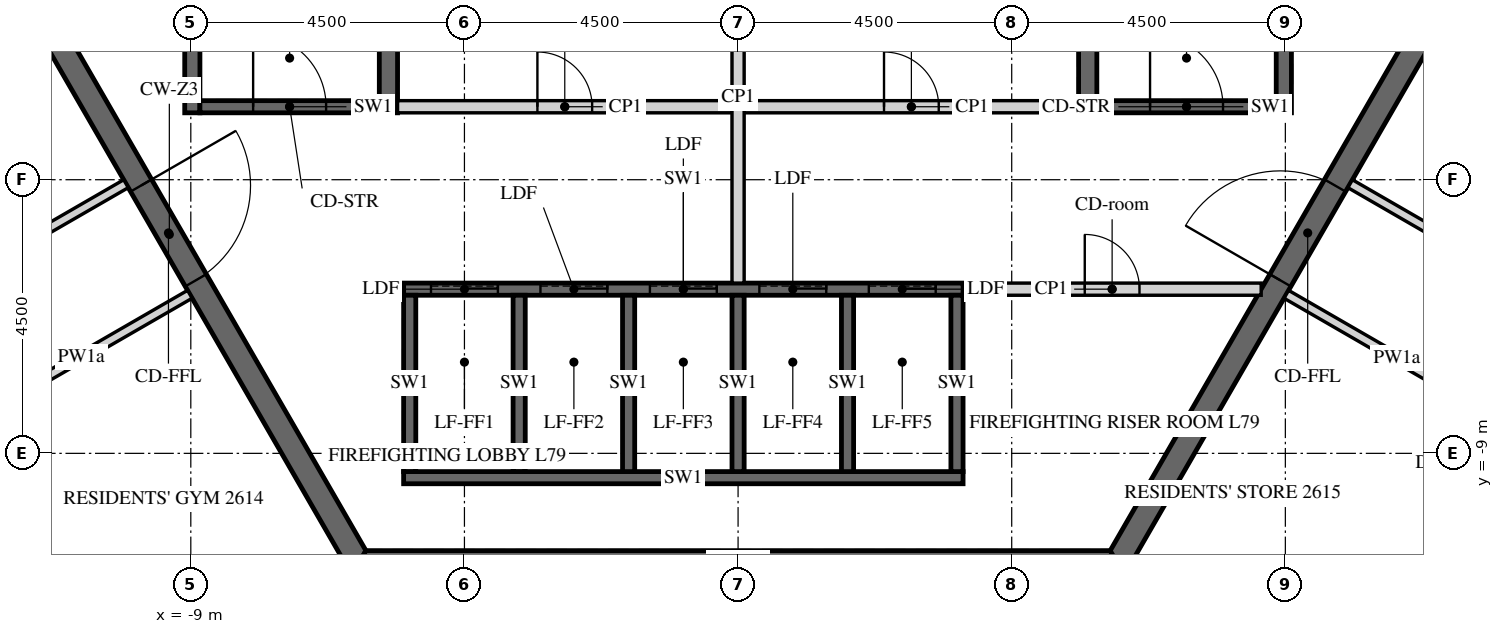
"""IFC4 building model, lengths in metres.
Left out: names, types, materials, properties, quantities, classifications, styles, units other than length and angle.
Written with IfcOpenShell. Run it as: python <this file> out.ifc"""

import sys

from ifc_helpers import new_model, si_unit, direction, frame, frame_2d, origin, place, context, subcontext, project, spatial, polyline, rectangle, outline, extrude, element, fill, save


model = new_model("IFC4")
c1 = context("Model", 3, precision=1e-05, world=origin(), true_north=direction((0.0, 1.0)))
c2 = subcontext(c1, "Body", "Model", "MODEL_VIEW")
j1 = project(units=[si_unit("LENGTHUNIT", "METRE"), si_unit("PLANEANGLEUNIT", "RADIAN")], contexts=[c1])
p1 = place(None, origin())
s1 = spatial("IfcSite", under=j1, at=p1, CompositionType="ELEMENT")
p2 = place(p1, origin())
s2 = spatial("IfcBuilding", under=s1, at=p2, CompositionType="ELEMENT")
p3 = place(p2, frame((0.0, 0.0, 326.4)))
s3 = spatial("IfcBuildingStorey", under=s2, at=p3, CompositionType="ELEMENT", Elevation=326.4)
p4 = place(p3, frame((-12.471, 0.0, -0.15), z_axis=(0.0, 0.0, 1.0), x_axis=(0.499996419489, -0.866027470984, 0.0)))
e1 = element("IfcWall", 1, at=p4, inside=s3, PredefinedType="SHEAR", context=c2, shape_type="SweptSolid", body=[
    extrude(outline(polyline([(-0.115, -0.2), (12.586, -0.2), (12.355, 0.2), (0.115, 0.2), (-0.115, -0.2)])), origin(), (0.0, 0.0, 1.0), 3.9),
])
p5 = place(p4, frame((5.306, 0.0, 0.15)))
e2 = element("IfcOpeningElement", 2, at=p5, cuts=e1, PredefinedType="OPENING", context=c2, shape_type="SweptSolid", body=[
    extrude(rectangle(XDim=1.8, YDim=2.4, at=frame_2d((0.9, 1.2))), frame((0.0, 0.21, 0.0), z_axis=(0.0, -1.0, 0.0), x_axis=(1.0, 0.0, 0.0)), (0.0, 0.0, 1.0), 0.42),
])
p6 = place(p3, frame((-6.235, -10.8, -0.15), z_axis=(0.0, 0.0, 1.0), x_axis=(1.0, 0.0, 0.0)))
e3 = element("IfcWall", 3, at=p6, inside=s3, PredefinedType="SHEAR", context=c2, shape_type="SweptSolid", body=[
    extrude(outline(polyline([(-0.115, -0.2), (12.586, -0.2), (12.355, 0.2), (0.115, 0.2), (-0.115, -0.2)])), origin(), (0.0, 0.0, 1.0), 3.9),
])
p7 = place(p3, frame((6.235, -10.8, -0.15), z_axis=(0.0, 0.0, 1.0), x_axis=(0.499996419489, 0.866027470984, 0.0)))
e4 = element("IfcWall", 4, at=p7, inside=s3, PredefinedType="SHEAR", context=c2, shape_type="SweptSolid", body=[
    extrude(outline(polyline([(-0.115, -0.2), (12.586, -0.2), (12.355, 0.2), (0.115, 0.2), (-0.115, -0.2)])), origin(), (0.0, 0.0, 1.0), 3.9),
])
p8 = place(p7, frame((5.364, 0.0, 0.15)))
e5 = element("IfcOpeningElement", 5, at=p8, cuts=e4, PredefinedType="OPENING", context=c2, shape_type="SweptSolid", body=[
    extrude(rectangle(XDim=1.8, YDim=2.4, at=frame_2d((0.9, 1.2))), frame((0.0, 0.21, 0.0), z_axis=(0.0, -1.0, 0.0), x_axis=(1.0, 0.0, 0.0)), (0.0, 0.0, 1.0), 0.42),
])
p9 = place(p3, frame((-5.5, -6.3, -0.25), z_axis=(0.0, 0.0, 1.0), x_axis=(1.0, 0.0, 0.0)))
e6 = element("IfcWall", 6, at=p9, inside=s3, PredefinedType="SHEAR", context=c2, shape_type="SweptSolid", body=[
    extrude(rectangle(XDim=9.2, YDim=0.2, at=frame_2d((4.6, 0.0))), origin(), (0.0, 0.0, 1.0), 3.9),
])
p10 = place(p9, frame((0.45, 0.0, 0.25)))
e7 = element("IfcOpeningElement", 7, at=p10, cuts=e6, PredefinedType="OPENING", context=c2, shape_type="SweptSolid", body=[
    extrude(rectangle(XDim=1.1, YDim=2.1, at=frame_2d((0.55, 1.05))), frame((0.0, 0.11, 0.0), z_axis=(0.0, -1.0, 0.0), x_axis=(1.0, 0.0, 0.0)), (0.0, 0.0, 1.0), 0.22),
])
p11 = place(p9, frame((2.25, 0.0, 0.25)))
e8 = element("IfcOpeningElement", 8, at=p11, cuts=e6, PredefinedType="OPENING", context=c2, shape_type="SweptSolid", body=[
    extrude(rectangle(XDim=1.1, YDim=2.1, at=frame_2d((0.55, 1.05))), frame((0.0, 0.11, 0.0), z_axis=(0.0, -1.0, 0.0), x_axis=(1.0, 0.0, 0.0)), (0.0, 0.0, 1.0), 0.22),
])
p12 = place(p9, frame((4.05, 0.0, 0.25)))
e9 = element("IfcOpeningElement", 9, at=p12, cuts=e6, PredefinedType="OPENING", context=c2, shape_type="SweptSolid", body=[
    extrude(rectangle(XDim=1.1, YDim=2.1, at=frame_2d((0.55, 1.05))), frame((0.0, 0.11, 0.0), z_axis=(0.0, -1.0, 0.0), x_axis=(1.0, 0.0, 0.0)), (0.0, 0.0, 1.0), 0.22),
])
p13 = place(p9, frame((5.85, 0.0, 0.25)))
e10 = element("IfcOpeningElement", 10, at=p13, cuts=e6, PredefinedType="OPENING", context=c2, shape_type="SweptSolid", body=[
    extrude(rectangle(XDim=1.1, YDim=2.1, at=frame_2d((0.55, 1.05))), frame((0.0, 0.11, 0.0), z_axis=(0.0, -1.0, 0.0), x_axis=(1.0, 0.0, 0.0)), (0.0, 0.0, 1.0), 0.22),
])
p14 = place(p9, frame((7.65, 0.0, 0.25)))
e11 = element("IfcOpeningElement", 11, at=p14, cuts=e6, PredefinedType="OPENING", context=c2, shape_type="SweptSolid", body=[
    extrude(rectangle(XDim=1.1, YDim=2.1, at=frame_2d((0.55, 1.05))), frame((0.0, 0.11, 0.0), z_axis=(0.0, -1.0, 0.0), x_axis=(1.0, 0.0, 0.0)), (0.0, 0.0, 1.0), 0.22),
])
p15 = place(p3, frame((-5.5, -9.4, -0.25), z_axis=(0.0, 0.0, 1.0), x_axis=(1.0, 0.0, 0.0)))
e12 = element("IfcWall", 12, at=p15, inside=s3, PredefinedType="SHEAR", context=c2, shape_type="SweptSolid", body=[
    extrude(rectangle(XDim=9.2, YDim=0.2, at=frame_2d((4.6, 0.0))), origin(), (0.0, 0.0, 1.0), 3.9),
])
for number, where, z_axis, x_axis in (
    (13, (-5.4, -9.3, -0.25), (0.0, 0.0, 1.0), (0.0, 1.0, 0.0)),
    (14, (-3.6, -9.3, -0.25), (0.0, 0.0, 1.0), (0.0, 1.0, 0.0)),
    (15, (-1.8, -9.3, -0.25), (0.0, 0.0, 1.0), (0.0, 1.0, 0.0)),
    (16, (0.0, -9.3, -0.25), (0.0, 0.0, 1.0), (0.0, 1.0, 0.0)),
    (17, (1.8, -9.3, -0.25), (0.0, 0.0, 1.0), (0.0, 1.0, 0.0)),
    (18, (3.6, -9.3, -0.25), (0.0, 0.0, 1.0), (0.0, 1.0, 0.0)),
):
    element("IfcWall", number, at=place(p3, frame(where, z_axis=z_axis, x_axis=x_axis)), inside=s3, PredefinedType="SHEAR", context=c2, shape_type="SweptSolid", body=[
        extrude(rectangle(XDim=2.9, YDim=0.2, at=frame_2d((1.45, 0.0))), origin(), (0.0, 0.0, 1.0), 3.9),
    ])
p16 = place(p3, frame((-5.6, -3.3, 0.0), z_axis=(0.0, 0.0, 1.0), x_axis=(1.0, 0.0, 0.0)))
e19 = element("IfcWall", 19, at=p16, inside=s3, PredefinedType="PARTITIONING", context=c2, shape_type="SweptSolid", body=[
    extrude(rectangle(XDim=5.5, YDim=0.2, at=frame_2d((2.75, 0.0))), origin(), (0.0, 0.0, 1.0), 3.65),
])
p17 = place(p16, frame((2.3, 0.0, 0.0)))
e20 = element("IfcOpeningElement", 20, at=p17, cuts=e19, PredefinedType="OPENING", context=c2, shape_type="SweptSolid", body=[
    extrude(rectangle(XDim=0.9, YDim=2.1, at=frame_2d((0.45, 1.05))), frame((0.0, 0.11, 0.0), z_axis=(0.0, -1.0, 0.0), x_axis=(1.0, 0.0, 0.0)), (0.0, 0.0, 1.0), 0.22),
])
p18 = place(p3, frame((0.1, -3.3, 0.0), z_axis=(0.0, 0.0, 1.0), x_axis=(1.0, 0.0, 0.0)))
e21 = element("IfcWall", 21, at=p18, inside=s3, PredefinedType="PARTITIONING", context=c2, shape_type="SweptSolid", body=[
    extrude(rectangle(XDim=5.5, YDim=0.2, at=frame_2d((2.75, 0.0))), origin(), (0.0, 0.0, 1.0), 3.65),
])
p19 = place(p18, frame((2.3, 0.0, 0.0)))
e22 = element("IfcOpeningElement", 22, at=p19, cuts=e21, PredefinedType="OPENING", context=c2, shape_type="SweptSolid", body=[
    extrude(rectangle(XDim=0.9, YDim=2.1, at=frame_2d((0.45, 1.05))), frame((0.0, 0.11, 0.0), z_axis=(0.0, -1.0, 0.0), x_axis=(1.0, 0.0, 0.0)), (0.0, 0.0, 1.0), 0.22),
])
p20 = place(p3, frame((0.0, -6.2, 0.0), z_axis=(0.0, 0.0, 1.0), x_axis=(0.0, 1.0, 0.0)))
e23 = element("IfcWall", 23, at=p20, inside=s3, PredefinedType="PARTITIONING", context=c2, shape_type="SweptSolid", body=[
    extrude(rectangle(XDim=6.1, YDim=0.2, at=frame_2d((3.05, 0.0))), origin(), (0.0, 0.0, 1.0), 3.65),
])
p21 = place(p3, frame((3.7, -6.3, 0.0), z_axis=(0.0, 0.0, 1.0), x_axis=(1.0, 0.0, 0.0)))
e24 = element("IfcWall", 24, at=p21, inside=s3, PredefinedType="PARTITIONING", context=c2, shape_type="SweptSolid", body=[
    extrude(rectangle(XDim=4.903, YDim=0.2, at=frame_2d((2.451, 0.0))), origin(), (0.0, 0.0, 1.0), 3.65),
])
p22 = place(p21, frame((2.001, 0.0, 0.0)))
e25 = element("IfcOpeningElement", 25, at=p22, cuts=e24, PredefinedType="OPENING", context=c2, shape_type="SweptSolid", body=[
    extrude(rectangle(XDim=0.9, YDim=2.1, at=frame_2d((0.45, 1.05))), frame((0.0, 0.11, 0.0), z_axis=(0.0, -1.0, 0.0), x_axis=(1.0, 0.0, 0.0)), (0.0, 0.0, 1.0), 0.22),
])
p23 = place(p3, frame((5.75, -3.4, -0.25), z_axis=(0.0, 0.0, 1.0), x_axis=(0.0, 1.0, 0.0)))
e26 = element("IfcWall", 26, at=p23, inside=s3, PredefinedType="SHEAR", context=c2, shape_type="SweptSolid", body=[
    extrude(rectangle(XDim=6.8, YDim=0.3, at=frame_2d((3.4, 0.0))), origin(), (0.0, 0.0, 1.0), 3.9),
])
p24 = place(p3, frame((8.975, -3.4, -0.25), z_axis=(0.0, 0.0, 1.0), x_axis=(0.0, 1.0, 0.0)))
e27 = element("IfcWall", 27, at=p24, inside=s3, PredefinedType="SHEAR", context=c2, shape_type="SweptSolid", body=[
    extrude(rectangle(XDim=6.8, YDim=0.25, at=frame_2d((3.4, 0.0))), origin(), (0.0, 0.0, 1.0), 3.9),
])
p25 = place(p3, frame((5.9, -3.3, -0.25), z_axis=(0.0, 0.0, 1.0), x_axis=(1.0, 0.0, 0.0)))
e28 = element("IfcWall", 28, at=p25, inside=s3, PredefinedType="SHEAR", context=c2, shape_type="SweptSolid", body=[
    extrude(rectangle(XDim=2.95, YDim=0.2, at=frame_2d((1.475, 0.0))), origin(), (0.0, 0.0, 1.0), 3.9),
])
p26 = place(p25, frame((0.875, 0.0, 0.25)))
e29 = element("IfcOpeningElement", 29, at=p26, cuts=e28, PredefinedType="OPENING", context=c2, shape_type="SweptSolid", body=[
    extrude(rectangle(XDim=1.2, YDim=2.4, at=frame_2d((0.6, 1.2))), frame((0.0, 0.11, 0.0), z_axis=(0.0, -1.0, 0.0), x_axis=(1.0, 0.0, 0.0)), (0.0, 0.0, 1.0), 0.22),
])
p27 = place(p3, frame((-5.75, -3.4, -0.25), z_axis=(0.0, 0.0, 1.0), x_axis=(0.0, 1.0, 0.0)))
e30 = element("IfcWall", 30, at=p27, inside=s3, PredefinedType="SHEAR", context=c2, shape_type="SweptSolid", body=[
    extrude(rectangle(XDim=6.8, YDim=0.3, at=frame_2d((3.4, 0.0))), origin(), (0.0, 0.0, 1.0), 3.9),
])
p28 = place(p3, frame((-8.975, -3.4, -0.25), z_axis=(0.0, 0.0, 1.0), x_axis=(0.0, 1.0, 0.0)))
e31 = element("IfcWall", 31, at=p28, inside=s3, PredefinedType="SHEAR", context=c2, shape_type="SweptSolid", body=[
    extrude(rectangle(XDim=6.8, YDim=0.25, at=frame_2d((3.4, 0.0))), origin(), (0.0, 0.0, 1.0), 3.9),
])
p29 = place(p3, frame((-8.85, -3.3, -0.25), z_axis=(0.0, 0.0, 1.0), x_axis=(1.0, 0.0, 0.0)))
e32 = element("IfcWall", 32, at=p29, inside=s3, PredefinedType="SHEAR", context=c2, shape_type="SweptSolid", body=[
    extrude(rectangle(XDim=2.95, YDim=0.2, at=frame_2d((1.475, 0.0))), origin(), (0.0, 0.0, 1.0), 3.9),
])
p30 = place(p29, frame((0.875, 0.0, 0.25)))
e33 = element("IfcOpeningElement", 33, at=p30, cuts=e32, PredefinedType="OPENING", context=c2, shape_type="SweptSolid", body=[
    extrude(rectangle(XDim=1.2, YDim=2.4, at=frame_2d((0.6, 1.2))), frame((0.0, 0.11, 0.0), z_axis=(0.0, -1.0, 0.0), x_axis=(1.0, 0.0, 0.0)), (0.0, 0.0, 1.0), 0.22),
])
p31 = place(p3, frame((-17.696, -2.749, 0.0), z_axis=(0.0, 0.0, 1.0), x_axis=(0.499997948852, -0.866026588012, 0.0)))
e34 = element("IfcWall", 34, at=p31, inside=s3, PredefinedType="PARTITIONING", context=c2, shape_type="SweptSolid", body=[
    extrude(rectangle(XDim=14.677, YDim=0.15, at=frame_2d((7.339, 0.0))), origin(), (0.0, 0.0, 1.0), 2.838),
])
p32 = place(p31, frame((0.4, 0.0, 0.0)))
e35 = element("IfcOpeningElement", 35, at=p32, cuts=e34, PredefinedType="OPENING", context=c2, shape_type="SweptSolid", body=[
    extrude(rectangle(XDim=1.0, YDim=2.1, at=frame_2d((0.5, 1.05))), frame((0.0, 0.085, 0.0), z_axis=(0.0, -1.0, 0.0), x_axis=(1.0, 0.0, 0.0)), (0.0, 0.0, 1.0), 0.17),
])
p33 = place(p31, frame((13.527, 0.0, 0.0)))
e36 = element("IfcOpeningElement", 36, at=p33, cuts=e34, PredefinedType="OPENING", context=c2, shape_type="SweptSolid", body=[
    extrude(rectangle(XDim=1.0, YDim=2.1, at=frame_2d((0.5, 1.05))), frame((0.0, 0.085, 0.0), z_axis=(0.0, -1.0, 0.0), x_axis=(1.0, 0.0, 0.0)), (0.0, 0.0, 1.0), 0.17),
])
p34 = place(p3, frame((-10.066, -4.566, 0.0), z_axis=(0.0, 0.0, 1.0), x_axis=(-0.866023935413, -0.500002543286, 0.0)))
e37 = element("IfcWall", 37, at=p34, inside=s3, PredefinedType="PARTITIONING", context=c2, shape_type="SweptSolid", body=[
    extrude(rectangle(XDim=4.2, YDim=0.15, at=frame_2d((2.1, 0.0))), origin(), (0.0, 0.0, 1.0), 2.838),
])
p35 = place(p3, frame((-9.569, -13.826, 0.0), z_axis=(0.0, 0.0, 1.0), x_axis=(-0.500017101833, 0.866015529811, 0.0)))
e38 = element("IfcWall", 38, at=p35, inside=s3, PredefinedType="PARTITIONING", context=c2, shape_type="SweptSolid", body=[
    extrude(rectangle(XDim=6.168, YDim=0.15, at=frame_2d((3.084, 0.0))), origin(), (0.0, 0.0, 1.0), 2.838),
])
p36 = place(p3, frame((-12.588, -8.447, 0.0), z_axis=(0.0, 0.0, 1.0), x_axis=(0.866034795751, 0.499983732284, 0.0)))
e39 = element("IfcWall", 39, at=p36, inside=s3, PredefinedType="PARTITIONING", context=c2, shape_type="SweptSolid", body=[
    extrude(rectangle(XDim=4.125, YDim=0.15, at=frame_2d((2.062, 0.0))), origin(), (0.0, 0.0, 1.0), 2.838),
])
p37 = place(p3, frame((11.229, -13.951, 0.0), z_axis=(0.0, 0.0, 1.0), x_axis=(0.499997948852, 0.866026588012, 0.0)))
e40 = element("IfcWall", 40, at=p37, inside=s3, PredefinedType="PARTITIONING", context=c2, shape_type="SweptSolid", body=[
    extrude(rectangle(XDim=14.677, YDim=0.15, at=frame_2d((7.339, 0.0))), origin(), (0.0, 0.0, 1.0), 2.838),
])
p38 = place(p37, frame((0.4, 0.0, 0.0)))
e41 = element("IfcOpeningElement", 41, at=p38, cuts=e40, PredefinedType="OPENING", context=c2, shape_type="SweptSolid", body=[
    extrude(rectangle(XDim=1.0, YDim=2.1, at=frame_2d((0.5, 1.05))), frame((0.0, 0.085, 0.0), z_axis=(0.0, -1.0, 0.0), x_axis=(1.0, 0.0, 0.0)), (0.0, 0.0, 1.0), 0.17),
])
p39 = place(p37, frame((13.527, 0.0, 0.0)))
e42 = element("IfcOpeningElement", 42, at=p39, cuts=e40, PredefinedType="OPENING", context=c2, shape_type="SweptSolid", body=[
    extrude(rectangle(XDim=1.0, YDim=2.1, at=frame_2d((0.5, 1.05))), frame((0.0, 0.085, 0.0), z_axis=(0.0, -1.0, 0.0), x_axis=(1.0, 0.0, 0.0)), (0.0, 0.0, 1.0), 0.17),
])
p40 = place(p3, frame((9.016, -6.384, 0.0), z_axis=(0.0, 0.0, 1.0), x_axis=(0.866023935413, -0.500002543286, 0.0)))
e43 = element("IfcWall", 43, at=p40, inside=s3, PredefinedType="PARTITIONING", context=c2, shape_type="SweptSolid", body=[
    extrude(rectangle(XDim=4.2, YDim=0.15, at=frame_2d((2.1, 0.0))), origin(), (0.0, 0.0, 1.0), 2.838),
])
p41 = place(p3, frame((12.615, -8.549, 0.0), z_axis=(0.0, 0.0, 1.0), x_axis=(-0.499985850067, -0.866033573098, 0.0)))
e44 = element("IfcWall", 44, at=p41, inside=s3, PredefinedType="PARTITIONING", context=c2, shape_type="SweptSolid", body=[
    extrude(rectangle(XDim=4.573, YDim=0.15, at=frame_2d((2.287, 0.0))), origin(), (0.0, 0.0, 1.0), 2.838),
])
p42 = place(p41, frame((1.837, 0.0, 0.0)))
e45 = element("IfcOpeningElement", 45, at=p42, cuts=e44, PredefinedType="OPENING", context=c2, shape_type="SweptSolid", body=[
    extrude(rectangle(XDim=0.9, YDim=2.1, at=frame_2d((0.45, 1.05))), frame((0.0, 0.085, 0.0), z_axis=(0.0, -1.0, 0.0), x_axis=(1.0, 0.0, 0.0)), (0.0, 0.0, 1.0), 0.17),
])
p43 = place(p3, frame((13.638, -6.628, 0.0), z_axis=(0.0, 0.0, 1.0), x_axis=(-0.866034795751, 0.499983732284, 0.0)))
e46 = element("IfcWall", 46, at=p43, inside=s3, PredefinedType="PARTITIONING", context=c2, shape_type="SweptSolid", body=[
    extrude(rectangle(XDim=4.125, YDim=0.15, at=frame_2d((2.062, 0.0))), origin(), (0.0, 0.0, 1.0), 2.838),
])
p44 = place(p5, origin())
e47 = element("IfcDoor", 47, at=p44, inside=s3, OperationType="DOUBLE_DOOR_SINGLE_SWING", PredefinedType="DOOR", context=c2, shape_type="SweptSolid", body=[
    extrude(rectangle(XDim=1.8, YDim=2.4, at=frame_2d((0.9, 1.2))), frame((0.0, 0.025, 0.0), z_axis=(0.0, -1.0, 0.0), x_axis=(1.0, 0.0, 0.0)), (0.0, 0.0, 1.0), 0.05),
])
fill(e2, e47)
p45 = place(p8, origin())
e48 = element("IfcDoor", 48, at=p45, inside=s3, OperationType="DOUBLE_DOOR_SINGLE_SWING", PredefinedType="DOOR", context=c2, shape_type="SweptSolid", body=[
    extrude(rectangle(XDim=1.8, YDim=2.4, at=frame_2d((0.9, 1.2))), frame((0.0, 0.025, 0.0), z_axis=(0.0, -1.0, 0.0), x_axis=(1.0, 0.0, 0.0)), (0.0, 0.0, 1.0), 0.05),
])
fill(e5, e48)
p46 = place(p17, origin())
e49 = element("IfcDoor", 49, at=p46, inside=s3, OperationType="SINGLE_SWING_LEFT", PredefinedType="DOOR", context=c2, shape_type="SweptSolid", body=[
    extrude(rectangle(XDim=0.9, YDim=2.1, at=frame_2d((0.45, 1.05))), frame((0.0, 0.025, 0.0), z_axis=(0.0, -1.0, 0.0), x_axis=(1.0, 0.0, 0.0)), (0.0, 0.0, 1.0), 0.05),
])
fill(e20, e49)
p47 = place(p19, origin())
e50 = element("IfcDoor", 50, at=p47, inside=s3, OperationType="SINGLE_SWING_LEFT", PredefinedType="DOOR", context=c2, shape_type="SweptSolid", body=[
    extrude(rectangle(XDim=0.9, YDim=2.1, at=frame_2d((0.45, 1.05))), frame((0.0, 0.025, 0.0), z_axis=(0.0, -1.0, 0.0), x_axis=(1.0, 0.0, 0.0)), (0.0, 0.0, 1.0), 0.05),
])
fill(e22, e50)
p48 = place(p22, origin())
e51 = element("IfcDoor", 51, at=p48, inside=s3, OperationType="SINGLE_SWING_LEFT", PredefinedType="DOOR", context=c2, shape_type="SweptSolid", body=[
    extrude(rectangle(XDim=0.9, YDim=2.1, at=frame_2d((0.45, 1.05))), frame((0.0, 0.025, 0.0), z_axis=(0.0, -1.0, 0.0), x_axis=(1.0, 0.0, 0.0)), (0.0, 0.0, 1.0), 0.05),
])
fill(e25, e51)
p49 = place(p26, origin())
e52 = element("IfcDoor", 52, at=p49, inside=s3, OperationType="SINGLE_SWING_LEFT", PredefinedType="DOOR", context=c2, shape_type="SweptSolid", body=[
    extrude(rectangle(XDim=1.2, YDim=2.4, at=frame_2d((0.6, 1.2))), frame((0.0, 0.025, 0.0), z_axis=(0.0, -1.0, 0.0), x_axis=(1.0, 0.0, 0.0)), (0.0, 0.0, 1.0), 0.05),
])
fill(e29, e52)
p50 = place(p30, origin())
e53 = element("IfcDoor", 53, at=p50, inside=s3, OperationType="SINGLE_SWING_LEFT", PredefinedType="DOOR", context=c2, shape_type="SweptSolid", body=[
    extrude(rectangle(XDim=1.2, YDim=2.4, at=frame_2d((0.6, 1.2))), frame((0.0, 0.025, 0.0), z_axis=(0.0, -1.0, 0.0), x_axis=(1.0, 0.0, 0.0)), (0.0, 0.0, 1.0), 0.05),
])
fill(e33, e53)
p51 = place(p10, origin())
e54 = element("IfcDoor", 54, at=p51, inside=s3, OperationType="SLIDING_TO_LEFT", PredefinedType="DOOR", context=c2, shape_type="SweptSolid", body=[
    extrude(rectangle(XDim=1.1, YDim=2.1, at=frame_2d((0.55, 1.05))), frame((0.0, 0.025, 0.0), z_axis=(0.0, -1.0, 0.0), x_axis=(1.0, 0.0, 0.0)), (0.0, 0.0, 1.0), 0.05),
])
fill(e7, e54)
p52 = place(p11, origin())
e55 = element("IfcDoor", 55, at=p52, inside=s3, OperationType="SLIDING_TO_LEFT", PredefinedType="DOOR", context=c2, shape_type="SweptSolid", body=[
    extrude(rectangle(XDim=1.1, YDim=2.1, at=frame_2d((0.55, 1.05))), frame((0.0, 0.025, 0.0), z_axis=(0.0, -1.0, 0.0), x_axis=(1.0, 0.0, 0.0)), (0.0, 0.0, 1.0), 0.05),
])
fill(e8, e55)
p53 = place(p12, origin())
e56 = element("IfcDoor", 56, at=p53, inside=s3, OperationType="SLIDING_TO_LEFT", PredefinedType="DOOR", context=c2, shape_type="SweptSolid", body=[
    extrude(rectangle(XDim=1.1, YDim=2.1, at=frame_2d((0.55, 1.05))), frame((0.0, 0.025, 0.0), z_axis=(0.0, -1.0, 0.0), x_axis=(1.0, 0.0, 0.0)), (0.0, 0.0, 1.0), 0.05),
])
fill(e9, e56)
p54 = place(p13, origin())
e57 = element("IfcDoor", 57, at=p54, inside=s3, OperationType="SLIDING_TO_LEFT", PredefinedType="DOOR", context=c2, shape_type="SweptSolid", body=[
    extrude(rectangle(XDim=1.1, YDim=2.1, at=frame_2d((0.55, 1.05))), frame((0.0, 0.025, 0.0), z_axis=(0.0, -1.0, 0.0), x_axis=(1.0, 0.0, 0.0)), (0.0, 0.0, 1.0), 0.05),
])
fill(e10, e57)
p55 = place(p14, origin())
e58 = element("IfcDoor", 58, at=p55, inside=s3, OperationType="SLIDING_TO_LEFT", PredefinedType="DOOR", context=c2, shape_type="SweptSolid", body=[
    extrude(rectangle(XDim=1.1, YDim=2.1, at=frame_2d((0.55, 1.05))), frame((0.0, 0.025, 0.0), z_axis=(0.0, -1.0, 0.0), x_axis=(1.0, 0.0, 0.0)), (0.0, 0.0, 1.0), 0.05),
])
fill(e11, e58)
p56 = place(p42, origin())
e59 = element("IfcDoor", 59, at=p56, inside=s3, OperationType="SINGLE_SWING_LEFT", PredefinedType="DOOR", context=c2, shape_type="SweptSolid", body=[
    extrude(rectangle(XDim=0.9, YDim=2.1, at=frame_2d((0.45, 1.05))), frame((0.0, 0.025, 0.0), z_axis=(0.0, -1.0, 0.0), x_axis=(1.0, 0.0, 0.0)), (0.0, 0.0, 1.0), 0.05),
])
fill(e45, e59)
save(model, sys.argv[1])
